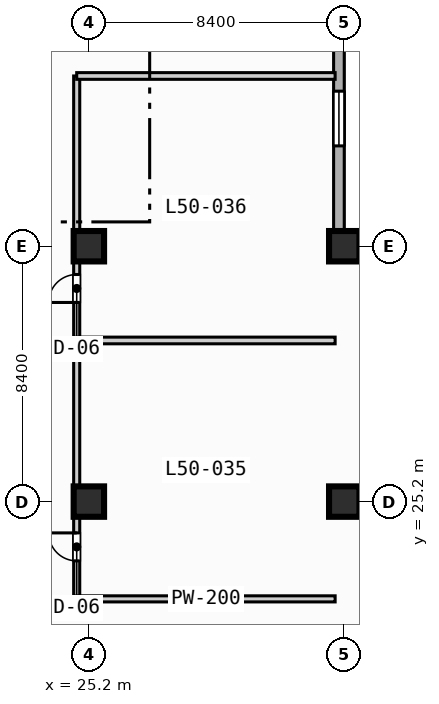
"""IFC4 building model, lengths in metres.
Left out: names, types, materials, properties, quantities, classifications, styles, units other than length and angle.
Written with IfcOpenShell. Run it as: python <this file> out.ifc"""

import sys

from ifc_helpers import new_model, si_unit, direction, frame, frame_2d, origin, origin_2d, place, context, subcontext, project, spatial, rectangle, extrude, element, fill, save


model = new_model("IFC4")
c1 = context("Model", 3, precision=1e-05, world=origin(), true_north=direction((0.0, 1.0)))
c2 = subcontext(c1, "Body", "Model", "MODEL_VIEW")
j1 = project(units=[si_unit("LENGTHUNIT", "METRE"), si_unit("PLANEANGLEUNIT", "RADIAN")], contexts=[c1])
p1 = place(None, origin())
s1 = spatial("IfcSite", under=j1, at=p1, CompositionType="ELEMENT")
p2 = place(p1, origin())
s2 = spatial("IfcBuilding", under=s1, at=p2, CompositionType="ELEMENT")
p3 = place(p2, frame((0.0, 0.0, 205.0)))
s3 = spatial("IfcBuildingStorey", under=s2, at=p3, CompositionType="ELEMENT", Elevation=205.0)
for number, where, z_axis, x_axis in (
    (1, (25.2, 25.2, 0.0), (0.0, 0.0, 1.0), (1.0, 0.0, 0.0)),
    (2, (25.2, 33.6, 0.0), (0.0, 0.0, 1.0), (1.0, 0.0, 0.0)),
    (3, (33.6, 25.2, 0.0), (0.0, 0.0, 1.0), (1.0, 0.0, 0.0)),
    (4, (33.6, 33.6, 0.0), (0.0, 0.0, 1.0), (1.0, 0.0, 0.0)),
):
    element("IfcColumn", number, at=place(p3, frame(where, z_axis=z_axis, x_axis=x_axis)), inside=s3, PredefinedType="COLUMN", context=c2, shape_type="SweptSolid", body=[
        extrude(rectangle(XDim=1.0, YDim=1.0, at=origin_2d()), origin(), (0.0, 0.0, 1.0), 3.7),
    ])
p4 = place(p3, frame((33.425, 72.425, 0.0), z_axis=(0.0, 0.0, 1.0), x_axis=(0.0, -1.0, 0.0)))
e5 = element("IfcWall", 5, at=p4, inside=s3, PredefinedType="STANDARD", context=c2, shape_type="SweptSolid", body=[
    extrude(rectangle(XDim=39.0, YDim=0.35, at=frame_2d((19.5, 0.0))), origin(), (0.0, 0.0, 1.0), 3.47),
])
p5 = place(p4, frame((33.725, 0.0, 0.85)))
e6 = element("IfcOpeningElement", 6, at=p5, cuts=e5, PredefinedType="OPENING", context=c2, shape_type="SweptSolid", body=[
    extrude(rectangle(XDim=1.8, YDim=1.8, at=frame_2d((0.9, 0.9))), frame((0.0, 0.185, 0.0), z_axis=(0.0, -1.0, 0.0), x_axis=(1.0, 0.0, 0.0)), (0.0, 0.0, 1.0), 0.37),
])
p6 = place(p4, frame((16.925, 0.0, 0.85)))
e7 = element("IfcOpeningElement", 7, at=p6, cuts=e5, PredefinedType="OPENING", context=c2, shape_type="SweptSolid", body=[
    extrude(rectangle(XDim=1.8, YDim=1.8, at=frame_2d((0.9, 0.9))), frame((0.0, 0.185, 0.0), z_axis=(0.0, -1.0, 0.0), x_axis=(1.0, 0.0, 0.0)), (0.0, 0.0, 1.0), 0.37),
])
p7 = place(p4, frame((8.225, 0.0, 0.85)))
e8 = element("IfcOpeningElement", 8, at=p7, cuts=e5, PredefinedType="OPENING", context=c2, shape_type="SweptSolid", body=[
    extrude(rectangle(XDim=2.4, YDim=1.95, at=frame_2d((1.2, 0.975))), frame((0.0, 0.185, 0.0), z_axis=(0.0, -1.0, 0.0), x_axis=(1.0, 0.0, 0.0)), (0.0, 0.0, 1.0), 0.37),
])
p8 = place(p3, frame((33.425, 33.425, 0.0), z_axis=(0.0, 0.0, 1.0), x_axis=(1.0, 0.0, 0.0)))
e9 = element("IfcWall", 9, at=p8, inside=s3, PredefinedType="STANDARD", context=c2, shape_type="SweptSolid", body=[
    extrude(rectangle(XDim=39.0, YDim=0.35, at=frame_2d((19.5, 0.0))), origin(), (0.0, 0.0, 1.0), 3.47),
])
p9 = place(p8, frame((12.075, 0.0, 0.0)))
e10 = element("IfcOpeningElement", 10, at=p9, cuts=e9, PredefinedType="OPENING", context=c2, shape_type="SweptSolid", body=[
    extrude(rectangle(XDim=1.4, YDim=2.2, at=frame_2d((0.7, 1.1))), frame((0.0, 0.185, 0.0), z_axis=(0.0, -1.0, 0.0), x_axis=(1.0, 0.0, 0.0)), (0.0, 0.0, 1.0), 0.37),
])
p10 = place(p3, frame((24.8, 22.0, 0.0), z_axis=(0.0, 0.0, 1.0), x_axis=(0.0, 1.0, 0.0)))
e11 = element("IfcWall", 11, at=p10, inside=s3, PredefinedType="PARTITIONING", context=c2, shape_type="SweptSolid", body=[
    extrude(rectangle(XDim=17.2, YDim=0.2, at=frame_2d((8.6, 0.0))), origin(), (0.0, 0.0, 1.0), 3.47),
])
p11 = place(p10, frame((1.25, 0.0, 0.0)))
e12 = element("IfcOpeningElement", 12, at=p11, cuts=e11, PredefinedType="OPENING", context=c2, shape_type="SweptSolid", body=[
    extrude(rectangle(XDim=0.92, YDim=2.1, at=frame_2d((0.46, 1.05))), frame((0.0, 0.11, 0.0), z_axis=(0.0, -1.0, 0.0), x_axis=(1.0, 0.0, 0.0)), (0.0, 0.0, 1.0), 0.22),
])
p12 = place(p10, frame((9.75, 0.0, 0.0)))
e13 = element("IfcOpeningElement", 13, at=p12, cuts=e11, PredefinedType="OPENING", context=c2, shape_type="SweptSolid", body=[
    extrude(rectangle(XDim=0.92, YDim=2.1, at=frame_2d((0.46, 1.05))), frame((0.0, 0.11, 0.0), z_axis=(0.0, -1.0, 0.0), x_axis=(1.0, 0.0, 0.0)), (0.0, 0.0, 1.0), 0.22),
])
p13 = place(p3, frame((24.8, 22.0, 0.0), z_axis=(0.0, 0.0, 1.0), x_axis=(1.0, 0.0, 0.0)))
e14 = element("IfcWall", 14, at=p13, inside=s3, PredefinedType="PARTITIONING", context=c2, shape_type="SweptSolid", body=[
    extrude(rectangle(XDim=8.5, YDim=0.2, at=frame_2d((4.25, 0.0))), origin(), (0.0, 0.0, 1.0), 3.47),
])
for number, where, z_axis, x_axis in (
    (15, (24.8, 30.5, 0.0), (0.0, 0.0, 1.0), (1.0, 0.0, 0.0)),
    (16, (24.8, 39.2, 0.0), (0.0, 0.0, 1.0), (1.0, 0.0, 0.0)),
):
    element("IfcWall", number, at=place(p3, frame(where, z_axis=z_axis, x_axis=x_axis)), inside=s3, PredefinedType="PARTITIONING", context=c2, shape_type="SweptSolid", body=[
        extrude(rectangle(XDim=8.5, YDim=0.22, at=frame_2d((4.25, 0.0))), origin(), (0.0, 0.0, 1.0), 3.47),
    ])
p14 = place(p5, origin())
e17 = element("IfcWindow", 17, at=p14, inside=s3, PartitioningType="SINGLE_PANEL", PredefinedType="WINDOW", context=c2, shape_type="SweptSolid", body=[
    extrude(rectangle(XDim=1.8, YDim=1.8, at=frame_2d((0.9, 0.9))), frame((0.0, 0.03, 0.0), z_axis=(0.0, -1.0, 0.0), x_axis=(1.0, 0.0, 0.0)), (0.0, 0.0, 1.0), 0.06),
])
fill(e6, e17)
p15 = place(p11, origin())
e18 = element("IfcDoor", 18, at=p15, inside=s3, OperationType="SINGLE_SWING_RIGHT", PredefinedType="DOOR", context=c2, shape_type="SweptSolid", body=[
    extrude(rectangle(XDim=0.92, YDim=2.1, at=frame_2d((0.46, 1.05))), frame((0.0, 0.025, 0.0), z_axis=(0.0, -1.0, 0.0), x_axis=(1.0, 0.0, 0.0)), (0.0, 0.0, 1.0), 0.05),
])
fill(e12, e18)
p16 = place(p12, origin())
e19 = element("IfcDoor", 19, at=p16, inside=s3, OperationType="SINGLE_SWING_LEFT", PredefinedType="DOOR", context=c2, shape_type="SweptSolid", body=[
    extrude(rectangle(XDim=0.92, YDim=2.1, at=frame_2d((0.46, 1.05))), frame((0.0, 0.025, 0.0), z_axis=(0.0, -1.0, 0.0), x_axis=(1.0, 0.0, 0.0)), (0.0, 0.0, 1.0), 0.05),
])
fill(e13, e19)
save(model, sys.argv[1])
